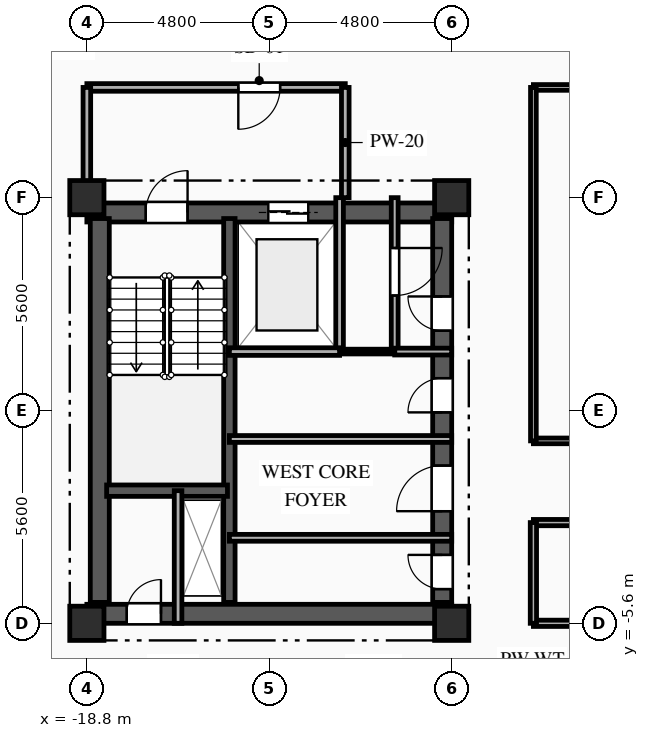
"""IFC4 building model, lengths in metres.
Left out: names, types, materials, properties, quantities, classifications, styles, units other than length and angle.
Written with IfcOpenShell. Run it as: python <this file> out.ifc"""

import sys

from ifc_helpers import new_model, si_unit, direction, frame, frame_2d, origin, origin_2d, place, context, subcontext, project, spatial, rectangle, extrude, element, fill, save


model = new_model("IFC4")
c1 = context("Model", 3, precision=1e-05, world=origin(), true_north=direction((0.0, 1.0)))
c2 = subcontext(c1, "Body", "Model", "MODEL_VIEW")
j1 = project(units=[si_unit("LENGTHUNIT", "METRE"), si_unit("PLANEANGLEUNIT", "RADIAN")], contexts=[c1])
p1 = place(None, origin())
s1 = spatial("IfcSite", under=j1, at=p1, CompositionType="ELEMENT")
p2 = place(p1, origin())
s2 = spatial("IfcBuilding", under=s1, at=p2, CompositionType="ELEMENT")
p3 = place(p2, frame((0.0, 0.0, 154.45)))
s3 = spatial("IfcBuildingStorey", under=s2, at=p3, CompositionType="ELEMENT", Elevation=154.45)
for number, where, z_axis, x_axis in (
    (1, (-18.8, -5.6, 0.0), (0.0, 0.0, 1.0), (1.0, 0.0, 0.0)),
    (2, (-18.8, 5.6, 0.0), (0.0, 0.0, 1.0), (1.0, 0.0, 0.0)),
    (3, (-9.2, -5.6, 0.0), (0.0, 0.0, 1.0), (1.0, 0.0, 0.0)),
    (4, (-9.2, 5.6, 0.0), (0.0, 0.0, 1.0), (1.0, 0.0, 0.0)),
):
    element("IfcColumn", number, at=place(p3, frame(where, z_axis=z_axis, x_axis=x_axis)), inside=s3, PredefinedType="COLUMN", context=c2, shape_type="SweptSolid", body=[
        extrude(rectangle(XDim=0.9, YDim=0.9, at=origin_2d()), origin(), (0.0, 0.0, 1.0), 3.35),
    ])
p4 = place(p3, frame((-18.8, 5.21, 0.0), z_axis=(0.0, 0.0, 1.0), x_axis=(1.0, 0.0, 0.0)))
e5 = element("IfcWall", 5, at=p4, inside=s3, PredefinedType="SHEAR", context=c2, shape_type="SweptSolid", body=[
    extrude(rectangle(XDim=9.6, YDim=0.5, at=frame_2d((4.8, 0.0))), origin(), (0.0, 0.0, 1.0), 3.04),
])
p5 = place(p4, frame((1.55, 0.0, 0.0)))
e6 = element("IfcOpeningElement", 6, at=p5, cuts=e5, PredefinedType="OPENING", context=c2, shape_type="SweptSolid", body=[
    extrude(rectangle(XDim=1.1, YDim=2.15, at=frame_2d((0.55, 1.075))), frame((0.0, 0.26, 0.0), z_axis=(0.0, -1.0, 0.0), x_axis=(1.0, 0.0, 0.0)), (0.0, 0.0, 1.0), 0.52),
])
p6 = place(p4, frame((4.775, 0.0, 0.0)))
e7 = element("IfcOpeningElement", 7, at=p6, cuts=e5, PredefinedType="OPENING", context=c2, shape_type="SweptSolid", body=[
    extrude(rectangle(XDim=1.05, YDim=2.1, at=frame_2d((0.525, 1.05))), frame((0.0, 0.26, 0.0), z_axis=(0.0, -1.0, 0.0), x_axis=(1.0, 0.0, 0.0)), (0.0, 0.0, 1.0), 0.52),
])
p7 = place(p3, frame((-18.8, -5.35, 0.0), z_axis=(0.0, 0.0, 1.0), x_axis=(1.0, 0.0, 0.0)))
e8 = element("IfcWall", 8, at=p7, inside=s3, PredefinedType="SHEAR", context=c2, shape_type="SweptSolid", body=[
    extrude(rectangle(XDim=9.6, YDim=0.5, at=frame_2d((4.8, 0.0))), origin(), (0.0, 0.0, 1.0), 3.04),
])
p8 = place(p7, frame((1.05, 0.0, 0.0)))
e9 = element("IfcOpeningElement", 9, at=p8, cuts=e8, PredefinedType="OPENING", context=c2, shape_type="SweptSolid", body=[
    extrude(rectangle(XDim=0.9, YDim=2.1, at=frame_2d((0.45, 1.05))), frame((0.0, 0.26, 0.0), z_axis=(0.0, -1.0, 0.0), x_axis=(1.0, 0.0, 0.0)), (0.0, 0.0, 1.0), 0.52),
])
p9 = place(p3, frame((-18.46, -5.05, 0.0), z_axis=(0.0, 0.0, 1.0), x_axis=(0.0, 1.0, 0.0)))
e10 = element("IfcWall", 10, at=p9, inside=s3, PredefinedType="SHEAR", context=c2, shape_type="SweptSolid", body=[
    extrude(rectangle(XDim=10.1, YDim=0.5, at=frame_2d((5.05, 0.0))), origin(), (0.0, 0.0, 1.0), 3.04),
])
p10 = place(p3, frame((-9.45, -5.05, 0.0), z_axis=(0.0, 0.0, 1.0), x_axis=(0.0, 1.0, 0.0)))
e11 = element("IfcWall", 11, at=p10, inside=s3, PredefinedType="SHEAR", context=c2, shape_type="SweptSolid", body=[
    extrude(rectangle(XDim=10.1, YDim=0.5, at=frame_2d((5.05, 0.0))), origin(), (0.0, 0.0, 1.0), 3.04),
])
p11 = place(p10, frame((7.15, 0.0, 0.0)))
e12 = element("IfcOpeningElement", 12, at=p11, cuts=e11, PredefinedType="OPENING", context=c2, shape_type="SweptSolid", body=[
    extrude(rectangle(XDim=0.9, YDim=2.1, at=frame_2d((0.45, 1.05))), frame((0.0, 0.26, 0.0), z_axis=(0.0, -1.0, 0.0), x_axis=(1.0, 0.0, 0.0)), (0.0, 0.0, 1.0), 0.52),
])
p12 = place(p10, frame((2.4, 0.0, 0.0)))
e13 = element("IfcOpeningElement", 13, at=p12, cuts=e11, PredefinedType="OPENING", context=c2, shape_type="SweptSolid", body=[
    extrude(rectangle(XDim=1.2, YDim=2.15, at=frame_2d((0.6, 1.075))), frame((0.0, 0.26, 0.0), z_axis=(0.0, -1.0, 0.0), x_axis=(1.0, 0.0, 0.0)), (0.0, 0.0, 1.0), 0.52),
])
p13 = place(p10, frame((0.35, 0.0, 0.0)))
e14 = element("IfcOpeningElement", 14, at=p13, cuts=e11, PredefinedType="OPENING", context=c2, shape_type="SweptSolid", body=[
    extrude(rectangle(XDim=0.9, YDim=2.1, at=frame_2d((0.45, 1.05))), frame((0.0, 0.26, 0.0), z_axis=(0.0, -1.0, 0.0), x_axis=(1.0, 0.0, 0.0)), (0.0, 0.0, 1.0), 0.52),
])
p14 = place(p10, frame((5.0, 0.0, 0.0)))
e15 = element("IfcOpeningElement", 15, at=p14, cuts=e11, PredefinedType="OPENING", context=c2, shape_type="SweptSolid", body=[
    extrude(rectangle(XDim=0.9, YDim=2.1, at=frame_2d((0.45, 1.05))), frame((0.0, 0.26, 0.0), z_axis=(0.0, -1.0, 0.0), x_axis=(1.0, 0.0, 0.0)), (0.0, 0.0, 1.0), 0.52),
])
p15 = place(p3, frame((-15.05, -5.05, 0.0), z_axis=(0.0, 0.0, 1.0), x_axis=(0.0, 1.0, 0.0)))
e16 = element("IfcWall", 16, at=p15, inside=s3, PredefinedType="SHEAR", context=c2, shape_type="SweptSolid", body=[
    extrude(rectangle(XDim=10.1, YDim=0.3, at=frame_2d((5.05, 0.0))), origin(), (0.0, 0.0, 1.0), 3.04),
])
p16 = place(p3, frame((-18.28, -2.11, 0.0), z_axis=(0.0, 0.0, 1.0), x_axis=(1.0, 0.0, 0.0)))
e17 = element("IfcWall", 17, at=p16, inside=s3, PredefinedType="SHEAR", context=c2, shape_type="SweptSolid", body=[
    extrude(rectangle(XDim=3.18, YDim=0.3, at=frame_2d((1.59, 0.0))), origin(), (0.0, 0.0, 1.0), 3.04),
])
p17 = place(p3, frame((-16.4, -5.6, 0.0), z_axis=(0.0, 0.0, 1.0), x_axis=(0.0, 1.0, 0.0)))
e18 = element("IfcWall", 18, at=p17, inside=s3, PredefinedType="PARTITIONING", context=c2, shape_type="SweptSolid", body=[
    extrude(rectangle(XDim=3.49, YDim=0.2, at=frame_2d((1.745, 0.0))), origin(), (0.0, 0.0, 1.0), 3.04),
])
p18 = place(p3, frame((-12.15, 1.55, 0.0), z_axis=(0.0, 0.0, 1.0), x_axis=(0.0, 1.0, 0.0)))
e19 = element("IfcWall", 19, at=p18, inside=s3, PredefinedType="PARTITIONING", context=c2, shape_type="SweptSolid", body=[
    extrude(rectangle(XDim=4.05, YDim=0.2, at=frame_2d((2.025, 0.0))), origin(), (0.0, 0.0, 1.0), 3.04),
])
p19 = place(p3, frame((-12.0, 8.5, 0.0), z_axis=(0.0, 0.0, 1.0), x_axis=(-1.0, 0.0, 0.0)))
e20 = element("IfcWall", 20, at=p19, inside=s3, PredefinedType="PARTITIONING", context=c2, shape_type="SweptSolid", body=[
    extrude(rectangle(XDim=6.8, YDim=0.2, at=frame_2d((3.4, 0.0))), origin(), (0.0, 0.0, 1.0), 3.04),
])
p20 = place(p19, frame((1.715, 0.0, 0.0)))
e21 = element("IfcOpeningElement", 21, at=p20, cuts=e20, PredefinedType="OPENING", context=c2, shape_type="SweptSolid", body=[
    extrude(rectangle(XDim=1.1, YDim=2.15, at=frame_2d((0.55, 1.075))), frame((0.0, 0.11, 0.0), z_axis=(0.0, -1.0, 0.0), x_axis=(1.0, 0.0, 0.0)), (0.0, 0.0, 1.0), 0.22),
])
p21 = place(p3, frame((-18.8, 8.5, 0.0), z_axis=(0.0, 0.0, 1.0), x_axis=(0.0, -1.0, 0.0)))
e22 = element("IfcWall", 22, at=p21, inside=s3, PredefinedType="PARTITIONING", context=c2, shape_type="SweptSolid", body=[
    extrude(rectangle(XDim=2.9, YDim=0.2, at=frame_2d((1.45, 0.0))), origin(), (0.0, 0.0, 1.0), 2.525),
])
p22 = place(p3, frame((-12.0, 5.6, 0.0), z_axis=(0.0, 0.0, 1.0), x_axis=(0.0, 1.0, 0.0)))
e23 = element("IfcWall", 23, at=p22, inside=s3, PredefinedType="PARTITIONING", context=c2, shape_type="SweptSolid", body=[
    extrude(rectangle(XDim=2.9, YDim=0.2, at=frame_2d((1.45, 0.0))), origin(), (0.0, 0.0, 1.0), 3.04),
])
p23 = place(p3, frame((-10.7, 5.6, 0.0), z_axis=(0.0, 0.0, 1.0), x_axis=(0.0, -1.0, 0.0)))
e24 = element("IfcWall", 24, at=p23, inside=s3, PredefinedType="PARTITIONING", context=c2, shape_type="SweptSolid", body=[
    extrude(rectangle(XDim=4.05, YDim=0.18, at=frame_2d((2.025, 0.0))), origin(), (0.0, 0.0, 1.0), 3.04),
])
p24 = place(p23, frame((1.325, 0.0, 0.0)))
e25 = element("IfcOpeningElement", 25, at=p24, cuts=e24, PredefinedType="OPENING", context=c2, shape_type="SweptSolid", body=[
    extrude(rectangle(XDim=1.25, YDim=2.2, at=frame_2d((0.625, 1.1))), frame((0.0, 0.1, 0.0), z_axis=(0.0, -1.0, 0.0), x_axis=(1.0, 0.0, 0.0)), (0.0, 0.0, 1.0), 0.2),
])
p25 = place(p3, frame((-10.7, 1.55, 0.0), z_axis=(0.0, 0.0, 1.0), x_axis=(1.0, 0.0, 0.0)))
e26 = element("IfcWall", 26, at=p25, inside=s3, PredefinedType="PARTITIONING", context=c2, shape_type="SweptSolid", body=[
    extrude(rectangle(XDim=1.5, YDim=0.18, at=frame_2d((0.75, 0.0))), origin(), (0.0, 0.0, 1.0), 3.04),
])
p26 = place(p3, frame((-12.15, 1.55, 0.0), z_axis=(0.0, 0.0, 1.0), x_axis=(1.0, 0.0, 0.0)))
e27 = element("IfcWall", 27, at=p26, inside=s3, PredefinedType="PARTITIONING", context=c2, shape_type="SweptSolid", body=[
    extrude(rectangle(XDim=1.45, YDim=0.125, at=frame_2d((0.725, 0.0))), origin(), (0.0, 0.0, 1.0), 3.04),
])
p27 = place(p3, frame((-15.05, -3.35, 0.0), z_axis=(0.0, 0.0, 1.0), x_axis=(1.0, 0.0, 0.0)))
e28 = element("IfcWall", 28, at=p27, inside=s3, PredefinedType="PARTITIONING", context=c2, shape_type="SweptSolid", body=[
    extrude(rectangle(XDim=5.85, YDim=0.18, at=frame_2d((2.925, 0.0))), origin(), (0.0, 0.0, 1.0), 2.755),
])
p28 = place(p3, frame((-9.2, -0.75, 0.0), z_axis=(0.0, 0.0, 1.0), x_axis=(-1.0, 0.0, 0.0)))
e29 = element("IfcWall", 29, at=p28, inside=s3, PredefinedType="PARTITIONING", context=c2, shape_type="SweptSolid", body=[
    extrude(rectangle(XDim=5.85, YDim=0.18, at=frame_2d((2.925, 0.0))), origin(), (0.0, 0.0, 1.0), 3.04),
])
p29 = place(p3, frame((0.0, 8.5, 0.0), z_axis=(0.0, 0.0, 1.0), x_axis=(-1.0, 0.0, 0.0)))
e30 = element("IfcWall", 30, at=p29, inside=s3, PredefinedType="PARTITIONING", context=c2, shape_type="SweptSolid", body=[
    extrude(rectangle(XDim=7.05, YDim=0.15, at=frame_2d((3.525, 0.0))), origin(), (0.0, 0.0, 1.0), 3.04),
])
p30 = place(p3, frame((-7.05, -5.6, 0.0), z_axis=(0.0, 0.0, 1.0), x_axis=(1.0, 0.0, 0.0)))
e31 = element("IfcWall", 31, at=p30, inside=s3, PredefinedType="PARTITIONING", context=c2, shape_type="SweptSolid", body=[
    extrude(rectangle(XDim=7.05, YDim=0.165, at=frame_2d((3.525, 0.0))), origin(), (0.0, 0.0, 1.0), 2.525),
])
p31 = place(p3, frame((-7.05, -0.8, 0.0), z_axis=(0.0, 0.0, 1.0), x_axis=(1.0, 0.0, 0.0)))
e32 = element("IfcWall", 32, at=p31, inside=s3, PredefinedType="PARTITIONING", context=c2, shape_type="SweptSolid", body=[
    extrude(rectangle(XDim=14.1, YDim=0.15, at=frame_2d((7.05, 0.0))), origin(), (0.0, 0.0, 1.0), 3.04),
])
p32 = place(p31, frame((6.525, 0.0, 0.0)))
e33 = element("IfcOpeningElement", 33, at=p32, cuts=e32, PredefinedType="OPENING", context=c2, shape_type="SweptSolid", body=[
    extrude(rectangle(XDim=1.05, YDim=2.15, at=frame_2d((0.525, 1.075))), frame((0.0, 0.085, 0.0), z_axis=(0.0, -1.0, 0.0), x_axis=(1.0, 0.0, 0.0)), (0.0, 0.0, 1.0), 0.17),
])
p33 = place(p3, frame((7.05, -2.95, 0.0), z_axis=(0.0, 0.0, 1.0), x_axis=(-1.0, 0.0, 0.0)))
e34 = element("IfcWall", 34, at=p33, inside=s3, PredefinedType="PARTITIONING", context=c2, shape_type="SweptSolid", body=[
    extrude(rectangle(XDim=14.1, YDim=0.165, at=frame_2d((7.05, 0.0))), origin(), (0.0, 0.0, 1.0), 3.04),
])
p34 = place(p33, frame((6.475, 0.0, 0.0)))
e35 = element("IfcOpeningElement", 35, at=p34, cuts=e34, PredefinedType="OPENING", context=c2, shape_type="SweptSolid", body=[
    extrude(rectangle(XDim=1.15, YDim=2.15, at=frame_2d((0.575, 1.075))), frame((0.0, 0.093, 0.0), z_axis=(0.0, -1.0, 0.0), x_axis=(1.0, 0.0, 0.0)), (0.0, 0.0, 1.0), 0.185),
])
p35 = place(p3, frame((-7.05, 8.5, 0.0), z_axis=(0.0, 0.0, 1.0), x_axis=(0.0, -1.0, 0.0)))
e36 = element("IfcWall", 36, at=p35, inside=s3, PredefinedType="PARTITIONING", context=c2, shape_type="SweptSolid", body=[
    extrude(rectangle(XDim=9.3, YDim=0.15, at=frame_2d((4.65, 0.0))), origin(), (0.0, 0.0, 1.0), 3.04),
])
p36 = place(p3, frame((-7.05, -2.95, 0.0), z_axis=(0.0, 0.0, 1.0), x_axis=(0.0, -1.0, 0.0)))
e37 = element("IfcWall", 37, at=p36, inside=s3, PredefinedType="PARTITIONING", context=c2, shape_type="SweptSolid", body=[
    extrude(rectangle(XDim=2.65, YDim=0.165, at=frame_2d((1.325, 0.0))), origin(), (0.0, 0.0, 1.0), 3.04),
])
p37 = place(p3, frame((-15.05, 1.55, 0.0), z_axis=(0.0, 0.0, 1.0), x_axis=(1.0, 0.0, 0.0)))
e38 = element("IfcWall", 38, at=p37, inside=s3, PredefinedType="PARTITIONING", context=c2, shape_type="SweptSolid", body=[
    extrude(rectangle(XDim=2.9, YDim=0.2, at=frame_2d((1.45, 0.0))), origin(), (0.0, 0.0, 1.0), 3.04),
])
p38 = place(p5, origin())
e39 = element("IfcDoor", 39, at=p38, inside=s3, OperationType="SINGLE_SWING_RIGHT", PredefinedType="DOOR", context=c2, shape_type="SweptSolid", body=[
    extrude(rectangle(XDim=1.1, YDim=2.15, at=frame_2d((0.55, 1.075))), frame((0.0, 0.025, 0.0), z_axis=(0.0, -1.0, 0.0), x_axis=(1.0, 0.0, 0.0)), (0.0, 0.0, 1.0), 0.05),
])
fill(e6, e39)
p39 = place(p6, origin())
e40 = element("IfcDoor", 40, at=p39, inside=s3, OperationType="DOUBLE_DOOR_SLIDING", PredefinedType="DOOR", context=c2, shape_type="SweptSolid", body=[
    extrude(rectangle(XDim=1.05, YDim=2.1, at=frame_2d((0.525, 1.05))), frame((0.0, 0.025, 0.0), z_axis=(0.0, -1.0, 0.0), x_axis=(1.0, 0.0, 0.0)), (0.0, 0.0, 1.0), 0.05),
])
fill(e7, e40)
p40 = place(p8, origin())
e41 = element("IfcDoor", 41, at=p40, inside=s3, OperationType="SINGLE_SWING_RIGHT", PredefinedType="DOOR", context=c2, shape_type="SweptSolid", body=[
    extrude(rectangle(XDim=0.9, YDim=2.1, at=frame_2d((0.45, 1.05))), frame((0.0, 0.025, 0.0), z_axis=(0.0, -1.0, 0.0), x_axis=(1.0, 0.0, 0.0)), (0.0, 0.0, 1.0), 0.05),
])
fill(e9, e41)
p41 = place(p20, origin())
e42 = element("IfcDoor", 42, at=p41, inside=s3, OperationType="SINGLE_SWING_RIGHT", PredefinedType="DOOR", context=c2, shape_type="SweptSolid", body=[
    extrude(rectangle(XDim=1.1, YDim=2.15, at=frame_2d((0.55, 1.075))), frame((0.0, 0.025, 0.0), z_axis=(0.0, -1.0, 0.0), x_axis=(1.0, 0.0, 0.0)), (0.0, 0.0, 1.0), 0.05),
])
fill(e21, e42)
p42 = place(p24, origin())
e43 = element("IfcDoor", 43, at=p42, inside=s3, OperationType="SINGLE_SWING_LEFT", PredefinedType="DOOR", context=c2, shape_type="SweptSolid", body=[
    extrude(rectangle(XDim=1.25, YDim=2.2, at=frame_2d((0.625, 1.1))), frame((0.0, 0.025, 0.0), z_axis=(0.0, -1.0, 0.0), x_axis=(1.0, 0.0, 0.0)), (0.0, 0.0, 1.0), 0.05),
])
fill(e25, e43)
p43 = place(p11, origin())
e44 = element("IfcDoor", 44, at=p43, inside=s3, OperationType="SINGLE_SWING_RIGHT", PredefinedType="DOOR", context=c2, shape_type="SweptSolid", body=[
    extrude(rectangle(XDim=0.9, YDim=2.1, at=frame_2d((0.45, 1.05))), frame((0.0, 0.025, 0.0), z_axis=(0.0, -1.0, 0.0), x_axis=(1.0, 0.0, 0.0)), (0.0, 0.0, 1.0), 0.05),
])
fill(e12, e44)
p44 = place(p12, origin())
e45 = element("IfcDoor", 45, at=p44, inside=s3, OperationType="SINGLE_SWING_LEFT", PredefinedType="DOOR", context=c2, shape_type="SweptSolid", body=[
    extrude(rectangle(XDim=1.2, YDim=2.15, at=frame_2d((0.6, 1.075))), frame((0.0, 0.025, 0.0), z_axis=(0.0, -1.0, 0.0), x_axis=(1.0, 0.0, 0.0)), (0.0, 0.0, 1.0), 0.05),
])
fill(e13, e45)
p45 = place(p13, origin())
e46 = element("IfcDoor", 46, at=p45, inside=s3, OperationType="SINGLE_SWING_RIGHT", PredefinedType="DOOR", context=c2, shape_type="SweptSolid", body=[
    extrude(rectangle(XDim=0.9, YDim=2.1, at=frame_2d((0.45, 1.05))), frame((0.0, 0.025, 0.0), z_axis=(0.0, -1.0, 0.0), x_axis=(1.0, 0.0, 0.0)), (0.0, 0.0, 1.0), 0.05),
])
fill(e14, e46)
p46 = place(p14, origin())
e47 = element("IfcDoor", 47, at=p46, inside=s3, OperationType="SINGLE_SWING_LEFT", PredefinedType="DOOR", context=c2, shape_type="SweptSolid", body=[
    extrude(rectangle(XDim=0.9, YDim=2.1, at=frame_2d((0.45, 1.05))), frame((0.0, 0.025, 0.0), z_axis=(0.0, -1.0, 0.0), x_axis=(1.0, 0.0, 0.0)), (0.0, 0.0, 1.0), 0.05),
])
fill(e15, e47)
save(model, sys.argv[1])
